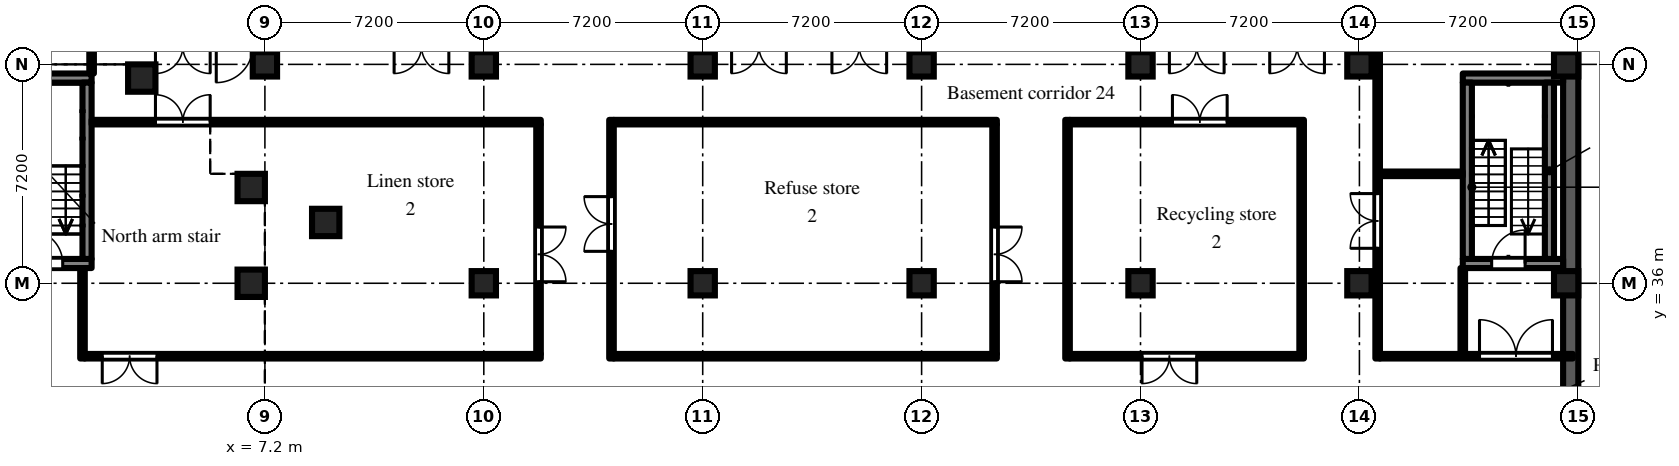
"""IFC4 building model, lengths in metres.
Left out: names, types, materials, properties, quantities, classifications, styles, units other than length and angle.
Written with IfcOpenShell. Run it as: python <this file> out.ifc"""

import sys

from ifc_helpers import new_model, si_unit, direction, frame, frame_2d, origin, origin_2d, place, context, subcontext, project, spatial, rectangle, extrude, element, fill, save


model = new_model("IFC4")
c1 = context("Model", 3, precision=1e-05, world=origin(), true_north=direction((0.0, 1.0)))
c2 = subcontext(c1, "Body", "Model", "MODEL_VIEW")
j1 = project(units=[si_unit("LENGTHUNIT", "METRE"), si_unit("PLANEANGLEUNIT", "RADIAN")], contexts=[c1])
p1 = place(None, origin())
s1 = spatial("IfcSite", under=j1, at=p1, CompositionType="ELEMENT")
p2 = place(p1, origin())
s2 = spatial("IfcBuilding", under=s1, at=p2, CompositionType="ELEMENT")
p3 = place(p2, frame((0.0, 0.0, -4.8)))
s3 = spatial("IfcBuildingStorey", under=s2, at=p3, CompositionType="ELEMENT", Elevation=-4.8)
p4 = place(p3, frame((50.15, -49.9, -0.5), z_axis=(0.0, 0.0, 1.0), x_axis=(0.0, 1.0, 0.0)))
e1 = element("IfcWall", 1, at=p4, inside=s3, PredefinedType="SOLIDWALL", context=c2, shape_type="SweptSolid", body=[
    extrude(rectangle(XDim=99.8, YDim=0.5, at=frame_2d((49.9, 0.0))), origin(), (0.0, 0.0, 1.0), 5.3),
])
for number, where, z_axis, x_axis in (
    (2, (3.15, 42.75, -0.5), (0.0, 0.0, 1.0), (1.0, 0.0, 0.0)),
    (3, (6.75, 36.0, -0.5), (0.0, 0.0, 1.0), (1.0, 0.0, 0.0)),
    (4, (6.75, 39.15, -0.5), (0.0, 0.0, 1.0), (1.0, 0.0, 0.0)),
):
    element("IfcColumn", number, at=place(p3, frame(where, z_axis=z_axis, x_axis=x_axis)), inside=s3, PredefinedType="COLUMN", context=c2, shape_type="SweptSolid", body=[
        extrude(rectangle(XDim=0.9, YDim=0.9, at=origin_2d()), origin(), (0.0, 0.0, 1.0), 5.3),
    ])
for number, where, z_axis, x_axis in (
    (5, (7.2, 43.2, -0.5), (0.0, 0.0, 1.0), (1.0, 0.0, 0.0)),
    (6, (14.4, 36.0, -0.5), (0.0, 0.0, 1.0), (1.0, 0.0, 0.0)),
    (7, (14.4, 43.2, -0.5), (0.0, 0.0, 1.0), (1.0, 0.0, 0.0)),
    (8, (21.6, 36.0, -0.5), (0.0, 0.0, 1.0), (1.0, 0.0, 0.0)),
    (9, (21.6, 43.2, -0.5), (0.0, 0.0, 1.0), (1.0, 0.0, 0.0)),
    (10, (28.8, 36.0, -0.5), (0.0, 0.0, 1.0), (1.0, 0.0, 0.0)),
    (11, (28.8, 43.2, -0.5), (0.0, 0.0, 1.0), (1.0, 0.0, 0.0)),
    (12, (36.0, 36.0, -0.5), (0.0, 0.0, 1.0), (1.0, 0.0, 0.0)),
    (13, (36.0, 43.2, -0.5), (0.0, 0.0, 1.0), (1.0, 0.0, 0.0)),
    (14, (43.2, 36.0, -0.5), (0.0, 0.0, 1.0), (1.0, 0.0, 0.0)),
    (15, (43.2, 43.2, -0.5), (0.0, 0.0, 1.0), (1.0, 0.0, 0.0)),
    (16, (50.0, 36.0, -0.5), (0.0, 0.0, 1.0), (1.0, 0.0, 0.0)),
    (17, (50.0, 43.2, -0.5), (0.0, 0.0, 1.0), (1.0, 0.0, 0.0)),
):
    element("IfcColumn", number, at=place(p3, frame(where, z_axis=z_axis, x_axis=x_axis)), inside=s3, PredefinedType="COLUMN", context=c2, shape_type="SweptSolid", body=[
        extrude(rectangle(XDim=0.8, YDim=0.8, at=origin_2d()), origin(), (0.0, 0.0, 1.0), 5.3),
    ])
p5 = place(p3, frame((9.2, 38.0, -0.5), z_axis=(0.0, 0.0, 1.0), x_axis=(1.0, 0.0, 0.0)))
e18 = element("IfcColumn", 18, at=p5, inside=s3, PredefinedType="COLUMN", context=c2, shape_type="SweptSolid", body=[
    extrude(rectangle(XDim=0.9, YDim=0.9, at=origin_2d()), origin(), (0.0, 0.0, 1.0), 5.3),
])
p6 = place(p3, frame((-1.5, 36.65, 0.0), z_axis=(0.0, 0.0, 1.0), x_axis=(1.0, 0.0, 0.0)))
e19 = element("IfcWall", 19, at=p6, inside=s3, PredefinedType="SHEAR", context=c2, shape_type="SweptSolid", body=[
    extrude(rectangle(XDim=3.0, YDim=0.3, at=frame_2d((1.5, 0.0))), origin(), (0.0, 0.0, 1.0), 4.35),
])
p7 = place(p6, frame((0.95, 0.0, 0.0)))
e20 = element("IfcOpeningElement", 20, at=p7, cuts=e19, PredefinedType="OPENING", context=c2, shape_type="SweptSolid", body=[
    extrude(rectangle(XDim=1.1, YDim=2.1, at=frame_2d((0.55, 1.05))), frame((0.0, 0.16, 0.0), z_axis=(0.0, -1.0, 0.0), x_axis=(1.0, 0.0, 0.0)), (0.0, 0.0, 1.0), 0.32),
])
p8 = place(p3, frame((-1.5, 42.75, 0.0), z_axis=(0.0, 0.0, 1.0), x_axis=(1.0, 0.0, 0.0)))
e21 = element("IfcWall", 21, at=p8, inside=s3, PredefinedType="SHEAR", context=c2, shape_type="SweptSolid", body=[
    extrude(rectangle(XDim=3.0, YDim=0.3, at=frame_2d((1.5, 0.0))), origin(), (0.0, 0.0, 1.0), 4.35),
])
p9 = place(p3, frame((1.35, 36.8, 0.0), z_axis=(0.0, 0.0, 1.0), x_axis=(0.0, 1.0, 0.0)))
e22 = element("IfcWall", 22, at=p9, inside=s3, PredefinedType="SHEAR", context=c2, shape_type="SweptSolid", body=[
    extrude(rectangle(XDim=5.8, YDim=0.3, at=frame_2d((2.9, 0.0))), origin(), (0.0, 0.0, 1.0), 4.35),
])
p10 = place(p3, frame((46.6, 36.65, 0.0), z_axis=(0.0, 0.0, 1.0), x_axis=(1.0, 0.0, 0.0)))
e23 = element("IfcWall", 23, at=p10, inside=s3, PredefinedType="SHEAR", context=c2, shape_type="SweptSolid", body=[
    extrude(rectangle(XDim=3.3, YDim=0.3, at=frame_2d((1.65, 0.0))), origin(), (0.0, 0.0, 1.0), 4.35),
])
p11 = place(p10, frame((0.95, 0.0, 0.0)))
e24 = element("IfcOpeningElement", 24, at=p11, cuts=e23, PredefinedType="OPENING", context=c2, shape_type="SweptSolid", body=[
    extrude(rectangle(XDim=1.1, YDim=2.1, at=frame_2d((0.55, 1.05))), frame((0.0, 0.16, 0.0), z_axis=(0.0, -1.0, 0.0), x_axis=(1.0, 0.0, 0.0)), (0.0, 0.0, 1.0), 0.32),
])
p12 = place(p3, frame((46.6, 42.75, 0.0), z_axis=(0.0, 0.0, 1.0), x_axis=(1.0, 0.0, 0.0)))
e25 = element("IfcWall", 25, at=p12, inside=s3, PredefinedType="SHEAR", context=c2, shape_type="SweptSolid", body=[
    extrude(rectangle(XDim=3.3, YDim=0.3, at=frame_2d((1.65, 0.0))), origin(), (0.0, 0.0, 1.0), 4.35),
])
for number, where, z_axis, x_axis in (
    (26, (46.75, 36.8, 0.0), (0.0, 0.0, 1.0), (0.0, 1.0, 0.0)),
    (27, (49.45, 36.8, 0.0), (0.0, 0.0, 1.0), (0.0, 1.0, 0.0)),
):
    element("IfcWall", number, at=place(p3, frame(where, z_axis=z_axis, x_axis=x_axis)), inside=s3, PredefinedType="SHEAR", context=c2, shape_type="SweptSolid", body=[
        extrude(rectangle(XDim=5.8, YDim=0.3, at=frame_2d((2.9, 0.0))), origin(), (0.0, 0.0, 1.0), 4.35),
    ])
p13 = place(p3, frame((1.2, 33.525, 0.0), z_axis=(0.0, 0.0, 1.0), x_axis=(0.0, 1.0, 0.0)))
e28 = element("IfcWall", 28, at=p13, inside=s3, PredefinedType="PARTITIONING", context=c2, shape_type="SweptSolid", body=[
    extrude(rectangle(XDim=2.975, YDim=0.15, at=frame_2d((1.488, 0.0))), origin(), (0.0, 0.0, 1.0), 4.35),
])
p14 = place(p3, frame((1.275, 33.6, 0.0), z_axis=(0.0, 0.0, 1.0), x_axis=(1.0, 0.0, 0.0)))
e29 = element("IfcWall", 29, at=p14, inside=s3, PredefinedType="PARTITIONING", context=c2, shape_type="SweptSolid", body=[
    extrude(rectangle(XDim=15.0, YDim=0.15, at=frame_2d((7.5, 0.0))), origin(), (0.0, 0.0, 1.0), 4.35),
])
p15 = place(p14, frame((0.575, 0.0, 0.0)))
e30 = element("IfcOpeningElement", 30, at=p15, cuts=e29, PredefinedType="OPENING", context=c2, shape_type="SweptSolid", body=[
    extrude(rectangle(XDim=1.8, YDim=2.1, at=frame_2d((0.9, 1.05))), frame((0.0, 0.085, 0.0), z_axis=(0.0, -1.0, 0.0), x_axis=(1.0, 0.0, 0.0)), (0.0, 0.0, 1.0), 0.17),
])
p16 = place(p3, frame((1.5, 41.3, 0.0), z_axis=(0.0, 0.0, 1.0), x_axis=(1.0, 0.0, 0.0)))
e31 = element("IfcWall", 31, at=p16, inside=s3, PredefinedType="PARTITIONING", context=c2, shape_type="SweptSolid", body=[
    extrude(rectangle(XDim=14.775, YDim=0.15, at=frame_2d((7.387, 0.0))), origin(), (0.0, 0.0, 1.0), 4.35),
])
p17 = place(p16, frame((2.1, 0.0, 0.0)))
e32 = element("IfcOpeningElement", 32, at=p17, cuts=e31, PredefinedType="OPENING", context=c2, shape_type="SweptSolid", body=[
    extrude(rectangle(XDim=1.8, YDim=2.1, at=frame_2d((0.9, 1.05))), frame((0.0, 0.085, 0.0), z_axis=(0.0, -1.0, 0.0), x_axis=(1.0, 0.0, 0.0)), (0.0, 0.0, 1.0), 0.17),
])
p18 = place(p3, frame((1.5, 42.9, 0.0), z_axis=(0.0, 0.0, 1.0), x_axis=(0.0, 1.0, 0.0)))
e33 = element("IfcWall", 33, at=p18, inside=s3, PredefinedType="PARTITIONING", context=c2, shape_type="SweptSolid", body=[
    extrude(rectangle(XDim=0.975, YDim=0.15, at=frame_2d((0.488, 0.0))), origin(), (0.0, 0.0, 1.0), 4.35),
])
p19 = place(p3, frame((16.2, 33.675, 0.0), z_axis=(0.0, 0.0, 1.0), x_axis=(0.0, 1.0, 0.0)))
e34 = element("IfcWall", 34, at=p19, inside=s3, PredefinedType="PARTITIONING", context=c2, shape_type="SweptSolid", body=[
    extrude(rectangle(XDim=7.55, YDim=0.15, at=frame_2d((3.775, 0.0))), origin(), (0.0, 0.0, 1.0), 4.35),
])
p20 = place(p19, frame((2.375, 0.0, 0.0)))
e35 = element("IfcOpeningElement", 35, at=p20, cuts=e34, PredefinedType="OPENING", context=c2, shape_type="SweptSolid", body=[
    extrude(rectangle(XDim=1.8, YDim=2.1, at=frame_2d((0.9, 1.05))), frame((0.0, 0.085, 0.0), z_axis=(0.0, -1.0, 0.0), x_axis=(1.0, 0.0, 0.0)), (0.0, 0.0, 1.0), 0.17),
])
p21 = place(p3, frame((18.6, 33.525, 0.0), z_axis=(0.0, 0.0, 1.0), x_axis=(0.0, 1.0, 0.0)))
e36 = element("IfcWall", 36, at=p21, inside=s3, PredefinedType="PARTITIONING", context=c2, shape_type="SweptSolid", body=[
    extrude(rectangle(XDim=7.85, YDim=0.15, at=frame_2d((3.925, 0.0))), origin(), (0.0, 0.0, 1.0), 4.35),
])
p22 = place(p21, frame((3.525, 0.0, 0.0)))
e37 = element("IfcOpeningElement", 37, at=p22, cuts=e36, PredefinedType="OPENING", context=c2, shape_type="SweptSolid", body=[
    extrude(rectangle(XDim=1.8, YDim=2.1, at=frame_2d((0.9, 1.05))), frame((0.0, 0.085, 0.0), z_axis=(0.0, -1.0, 0.0), x_axis=(1.0, 0.0, 0.0)), (0.0, 0.0, 1.0), 0.17),
])
for number, where, z_axis, x_axis in (
    (38, (18.675, 33.6, 0.0), (0.0, 0.0, 1.0), (1.0, 0.0, 0.0)),
    (39, (18.675, 41.3, 0.0), (0.0, 0.0, 1.0), (1.0, 0.0, 0.0)),
):
    element("IfcWall", number, at=place(p3, frame(where, z_axis=z_axis, x_axis=x_axis)), inside=s3, PredefinedType="PARTITIONING", context=c2, shape_type="SweptSolid", body=[
        extrude(rectangle(XDim=12.6, YDim=0.15, at=frame_2d((6.3, 0.0))), origin(), (0.0, 0.0, 1.0), 4.35),
    ])
p23 = place(p3, frame((31.2, 33.675, 0.0), z_axis=(0.0, 0.0, 1.0), x_axis=(0.0, 1.0, 0.0)))
e40 = element("IfcWall", 40, at=p23, inside=s3, PredefinedType="PARTITIONING", context=c2, shape_type="SweptSolid", body=[
    extrude(rectangle(XDim=7.55, YDim=0.15, at=frame_2d((3.775, 0.0))), origin(), (0.0, 0.0, 1.0), 4.35),
])
p24 = place(p23, frame((2.375, 0.0, 0.0)))
e41 = element("IfcOpeningElement", 41, at=p24, cuts=e40, PredefinedType="OPENING", context=c2, shape_type="SweptSolid", body=[
    extrude(rectangle(XDim=1.8, YDim=2.1, at=frame_2d((0.9, 1.05))), frame((0.0, 0.085, 0.0), z_axis=(0.0, -1.0, 0.0), x_axis=(1.0, 0.0, 0.0)), (0.0, 0.0, 1.0), 0.17),
])
p25 = place(p3, frame((33.6, 33.525, 0.0), z_axis=(0.0, 0.0, 1.0), x_axis=(0.0, 1.0, 0.0)))
e42 = element("IfcWall", 42, at=p25, inside=s3, PredefinedType="PARTITIONING", context=c2, shape_type="SweptSolid", body=[
    extrude(rectangle(XDim=7.85, YDim=0.15, at=frame_2d((3.925, 0.0))), origin(), (0.0, 0.0, 1.0), 4.35),
])
p26 = place(p3, frame((33.675, 33.6, 0.0), z_axis=(0.0, 0.0, 1.0), x_axis=(1.0, 0.0, 0.0)))
e43 = element("IfcWall", 43, at=p26, inside=s3, PredefinedType="PARTITIONING", context=c2, shape_type="SweptSolid", body=[
    extrude(rectangle(XDim=7.7, YDim=0.15, at=frame_2d((3.85, 0.0))), origin(), (0.0, 0.0, 1.0), 4.35),
])
p27 = place(p26, frame((2.375, 0.0, 0.0)))
e44 = element("IfcOpeningElement", 44, at=p27, cuts=e43, PredefinedType="OPENING", context=c2, shape_type="SweptSolid", body=[
    extrude(rectangle(XDim=1.8, YDim=2.1, at=frame_2d((0.9, 1.05))), frame((0.0, 0.085, 0.0), z_axis=(0.0, -1.0, 0.0), x_axis=(1.0, 0.0, 0.0)), (0.0, 0.0, 1.0), 0.17),
])
p28 = place(p3, frame((33.675, 41.3, 0.0), z_axis=(0.0, 0.0, 1.0), x_axis=(1.0, 0.0, 0.0)))
e45 = element("IfcWall", 45, at=p28, inside=s3, PredefinedType="PARTITIONING", context=c2, shape_type="SweptSolid", body=[
    extrude(rectangle(XDim=7.7, YDim=0.15, at=frame_2d((3.85, 0.0))), origin(), (0.0, 0.0, 1.0), 4.35),
])
p29 = place(p28, frame((3.375, 0.0, 0.0)))
e46 = element("IfcOpeningElement", 46, at=p29, cuts=e45, PredefinedType="OPENING", context=c2, shape_type="SweptSolid", body=[
    extrude(rectangle(XDim=1.8, YDim=2.1, at=frame_2d((0.9, 1.05))), frame((0.0, 0.085, 0.0), z_axis=(0.0, -1.0, 0.0), x_axis=(1.0, 0.0, 0.0)), (0.0, 0.0, 1.0), 0.17),
])
p30 = place(p3, frame((41.3, 33.675, 0.0), z_axis=(0.0, 0.0, 1.0), x_axis=(0.0, 1.0, 0.0)))
e47 = element("IfcWall", 47, at=p30, inside=s3, PredefinedType="PARTITIONING", context=c2, shape_type="SweptSolid", body=[
    extrude(rectangle(XDim=7.55, YDim=0.15, at=frame_2d((3.775, 0.0))), origin(), (0.0, 0.0, 1.0), 4.35),
])
p31 = place(p3, frame((43.8, 33.525, 0.0), z_axis=(0.0, 0.0, 1.0), x_axis=(0.0, 1.0, 0.0)))
e48 = element("IfcWall", 48, at=p31, inside=s3, PredefinedType="PARTITIONING", context=c2, shape_type="SweptSolid", body=[
    extrude(rectangle(XDim=10.2, YDim=0.15, at=frame_2d((5.1, 0.0))), origin(), (0.0, 0.0, 1.0), 4.35),
])
p32 = place(p31, frame((3.625, 0.0, 0.0)))
e49 = element("IfcOpeningElement", 49, at=p32, cuts=e48, PredefinedType="OPENING", context=c2, shape_type="SweptSolid", body=[
    extrude(rectangle(XDim=1.8, YDim=2.1, at=frame_2d((0.9, 1.05))), frame((0.0, 0.085, 0.0), z_axis=(0.0, -1.0, 0.0), x_axis=(1.0, 0.0, 0.0)), (0.0, 0.0, 1.0), 0.17),
])
p33 = place(p3, frame((43.875, 33.6, 0.0), z_axis=(0.0, 0.0, 1.0), x_axis=(1.0, 0.0, 0.0)))
e50 = element("IfcWall", 50, at=p33, inside=s3, PredefinedType="PARTITIONING", context=c2, shape_type="SweptSolid", body=[
    extrude(rectangle(XDim=6.345, YDim=0.15, at=frame_2d((3.172, 0.0))), origin(), (0.0, 0.0, 1.0), 4.35),
])
p34 = place(p33, frame((3.275, 0.0, 0.0)))
e51 = element("IfcOpeningElement", 51, at=p34, cuts=e50, PredefinedType="OPENING", context=c2, shape_type="SweptSolid", body=[
    extrude(rectangle(XDim=2.4, YDim=2.1, at=frame_2d((1.2, 1.05))), frame((0.0, 0.085, 0.0), z_axis=(0.0, -1.0, 0.0), x_axis=(1.0, 0.0, 0.0)), (0.0, 0.0, 1.0), 0.17),
])
p35 = place(p3, frame((43.875, 39.6, 0.0), z_axis=(0.0, 0.0, 1.0), x_axis=(1.0, 0.0, 0.0)))
e52 = element("IfcWall", 52, at=p35, inside=s3, PredefinedType="PARTITIONING", context=c2, shape_type="SweptSolid", body=[
    extrude(rectangle(XDim=2.725, YDim=0.15, at=frame_2d((1.363, 0.0))), origin(), (0.0, 0.0, 1.0), 4.35),
])
p36 = place(p3, frame((46.6, 33.675, 0.0), z_axis=(0.0, 0.0, 1.0), x_axis=(0.0, 1.0, 0.0)))
e53 = element("IfcWall", 53, at=p36, inside=s3, PredefinedType="PARTITIONING", context=c2, shape_type="SweptSolid", body=[
    extrude(rectangle(XDim=2.825, YDim=0.15, at=frame_2d((1.413, 0.0))), origin(), (0.0, 0.0, 1.0), 4.35),
])
p37 = place(p7, origin())
e54 = element("IfcDoor", 54, at=p37, inside=s3, OperationType="SINGLE_SWING_LEFT", PredefinedType="DOOR", context=c2, shape_type="SweptSolid", body=[
    extrude(rectangle(XDim=1.1, YDim=2.1, at=frame_2d((0.55, 1.05))), frame((0.0, 0.025, 0.0), z_axis=(0.0, -1.0, 0.0), x_axis=(1.0, 0.0, 0.0)), (0.0, 0.0, 1.0), 0.05),
])
fill(e20, e54)
p38 = place(p11, origin())
e55 = element("IfcDoor", 55, at=p38, inside=s3, OperationType="SINGLE_SWING_RIGHT", PredefinedType="DOOR", context=c2, shape_type="SweptSolid", body=[
    extrude(rectangle(XDim=1.1, YDim=2.1, at=frame_2d((0.55, 1.05))), frame((0.0, 0.025, 0.0), z_axis=(0.0, -1.0, 0.0), x_axis=(1.0, 0.0, 0.0)), (0.0, 0.0, 1.0), 0.05),
])
fill(e24, e55)
p39 = place(p34, origin())
e56 = element("IfcDoor", 56, at=p39, inside=s3, OperationType="DOUBLE_DOOR_DOUBLE_SWING", PredefinedType="DOOR", context=c2, shape_type="SweptSolid", body=[
    extrude(rectangle(XDim=2.4, YDim=2.1, at=frame_2d((1.2, 1.05))), frame((0.0, 0.025, 0.0), z_axis=(0.0, -1.0, 0.0), x_axis=(1.0, 0.0, 0.0)), (0.0, 0.0, 1.0), 0.05),
])
fill(e51, e56)
p40 = place(p15, frame((1.8, 0.0, 0.0), z_axis=(0.0, 0.0, 1.0), x_axis=(-1.0, 0.0, 0.0)))
e57 = element("IfcDoor", 57, at=p40, inside=s3, OperationType="DOUBLE_DOOR_DOUBLE_SWING", PredefinedType="DOOR", context=c2, shape_type="SweptSolid", body=[
    extrude(rectangle(XDim=1.8, YDim=2.1, at=frame_2d((0.9, 1.05))), frame((0.0, 0.025, 0.0), z_axis=(0.0, -1.0, 0.0), x_axis=(1.0, 0.0, 0.0)), (0.0, 0.0, 1.0), 0.05),
])
fill(e30, e57)
p41 = place(p17, origin())
e58 = element("IfcDoor", 58, at=p41, inside=s3, OperationType="DOUBLE_DOOR_DOUBLE_SWING", PredefinedType="DOOR", context=c2, shape_type="SweptSolid", body=[
    extrude(rectangle(XDim=1.8, YDim=2.1, at=frame_2d((0.9, 1.05))), frame((0.0, 0.025, 0.0), z_axis=(0.0, -1.0, 0.0), x_axis=(1.0, 0.0, 0.0)), (0.0, 0.0, 1.0), 0.05),
])
fill(e32, e58)
p42 = place(p20, frame((1.8, 0.0, 0.0), z_axis=(0.0, 0.0, 1.0), x_axis=(-1.0, 0.0, 0.0)))
e59 = element("IfcDoor", 59, at=p42, inside=s3, OperationType="DOUBLE_DOOR_DOUBLE_SWING", PredefinedType="DOOR", context=c2, shape_type="SweptSolid", body=[
    extrude(rectangle(XDim=1.8, YDim=2.1, at=frame_2d((0.9, 1.05))), frame((0.0, 0.025, 0.0), z_axis=(0.0, -1.0, 0.0), x_axis=(1.0, 0.0, 0.0)), (0.0, 0.0, 1.0), 0.05),
])
fill(e35, e59)
p43 = place(p22, origin())
e60 = element("IfcDoor", 60, at=p43, inside=s3, OperationType="DOUBLE_DOOR_DOUBLE_SWING", PredefinedType="DOOR", context=c2, shape_type="SweptSolid", body=[
    extrude(rectangle(XDim=1.8, YDim=2.1, at=frame_2d((0.9, 1.05))), frame((0.0, 0.025, 0.0), z_axis=(0.0, -1.0, 0.0), x_axis=(1.0, 0.0, 0.0)), (0.0, 0.0, 1.0), 0.05),
])
fill(e37, e60)
p44 = place(p24, frame((1.8, 0.0, 0.0), z_axis=(0.0, 0.0, 1.0), x_axis=(-1.0, 0.0, 0.0)))
e61 = element("IfcDoor", 61, at=p44, inside=s3, OperationType="DOUBLE_DOOR_DOUBLE_SWING", PredefinedType="DOOR", context=c2, shape_type="SweptSolid", body=[
    extrude(rectangle(XDim=1.8, YDim=2.1, at=frame_2d((0.9, 1.05))), frame((0.0, 0.025, 0.0), z_axis=(0.0, -1.0, 0.0), x_axis=(1.0, 0.0, 0.0)), (0.0, 0.0, 1.0), 0.05),
])
fill(e41, e61)
p45 = place(p27, frame((1.8, 0.0, 0.0), z_axis=(0.0, 0.0, 1.0), x_axis=(-1.0, 0.0, 0.0)))
e62 = element("IfcDoor", 62, at=p45, inside=s3, OperationType="DOUBLE_DOOR_DOUBLE_SWING", PredefinedType="DOOR", context=c2, shape_type="SweptSolid", body=[
    extrude(rectangle(XDim=1.8, YDim=2.1, at=frame_2d((0.9, 1.05))), frame((0.0, 0.025, 0.0), z_axis=(0.0, -1.0, 0.0), x_axis=(1.0, 0.0, 0.0)), (0.0, 0.0, 1.0), 0.05),
])
fill(e44, e62)
p46 = place(p29, origin())
e63 = element("IfcDoor", 63, at=p46, inside=s3, OperationType="DOUBLE_DOOR_DOUBLE_SWING", PredefinedType="DOOR", context=c2, shape_type="SweptSolid", body=[
    extrude(rectangle(XDim=1.8, YDim=2.1, at=frame_2d((0.9, 1.05))), frame((0.0, 0.025, 0.0), z_axis=(0.0, -1.0, 0.0), x_axis=(1.0, 0.0, 0.0)), (0.0, 0.0, 1.0), 0.05),
])
fill(e46, e63)
p47 = place(p32, origin())
e64 = element("IfcDoor", 64, at=p47, inside=s3, OperationType="DOUBLE_DOOR_DOUBLE_SWING", PredefinedType="DOOR", context=c2, shape_type="SweptSolid", body=[
    extrude(rectangle(XDim=1.8, YDim=2.1, at=frame_2d((0.9, 1.05))), frame((0.0, 0.025, 0.0), z_axis=(0.0, -1.0, 0.0), x_axis=(1.0, 0.0, 0.0)), (0.0, 0.0, 1.0), 0.05),
])
fill(e49, e64)
save(model, sys.argv[1])
